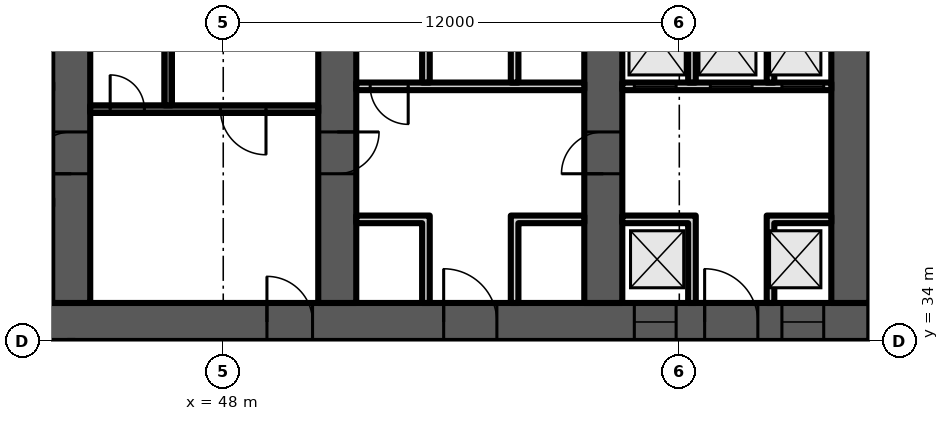
"""IFC4 building model, lengths in metres.
Left out: names, types, materials, properties, quantities, classifications, styles, units other than length and angle.
Written with IfcOpenShell. Run it as: python <this file> out.ifc"""

import sys

from ifc_helpers import new_model, si_unit, direction, frame, frame_2d, origin, place, context, subcontext, project, spatial, polyline, rectangle, outline, extrude, element, fill, save


model = new_model("IFC4")
c1 = context("Model", 3, precision=1e-05, world=origin(), true_north=direction((0.0, 1.0)))
c2 = subcontext(c1, "Body", "Model", "MODEL_VIEW")
j1 = project(units=[si_unit("LENGTHUNIT", "METRE"), si_unit("PLANEANGLEUNIT", "RADIAN")], contexts=[c1])
p1 = place(None, origin())
s1 = spatial("IfcSite", under=j1, at=p1, CompositionType="ELEMENT")
p2 = place(p1, origin())
s2 = spatial("IfcBuilding", under=s1, at=p2, CompositionType="ELEMENT")
p3 = place(p2, frame((0.0, 0.0, 96.7)))
s3 = spatial("IfcBuildingStorey", under=s2, at=p3, CompositionType="ELEMENT", Elevation=96.7)
p4 = place(p3, frame((16.0, 34.5, 0.0), z_axis=(0.0, 0.0, 1.0), x_axis=(1.0, 0.0, 0.0)))
e1 = element("IfcWall", 1, at=p4, inside=s3, PredefinedType="SHEAR", context=c2, shape_type="SweptSolid", body=[
    extrude(rectangle(XDim=49.0, YDim=1.0, at=frame_2d((24.5, 0.0))), origin(), (0.0, 0.0, 1.0), 3.6),
])
p5 = place(p4, frame((1.2, 0.0, 0.0)))
e2 = element("IfcOpeningElement", 2, at=p5, cuts=e1, PredefinedType="OPENING", context=c2, shape_type="SweptSolid", body=[
    extrude(rectangle(XDim=1.1, YDim=2.1, at=frame_2d((0.55, 1.05))), frame((0.0, 0.51, 0.0), z_axis=(0.0, -1.0, 0.0), x_axis=(1.0, 0.0, 0.0)), (0.0, 0.0, 1.0), 1.02),
])
p6 = place(p4, frame((5.083, 0.0, 0.0)))
e3 = element("IfcOpeningElement", 3, at=p6, cuts=e1, PredefinedType="OPENING", context=c2, shape_type="SweptSolid", body=[
    extrude(rectangle(XDim=1.1, YDim=2.1, at=frame_2d((0.55, 1.05))), frame((0.0, 0.51, 0.0), z_axis=(0.0, -1.0, 0.0), x_axis=(1.0, 0.0, 0.0)), (0.0, 0.0, 1.0), 1.02),
])
p7 = place(p4, frame((2.933, 0.0, 0.0)))
e4 = element("IfcOpeningElement", 4, at=p7, cuts=e1, PredefinedType="OPENING", context=c2, shape_type="SweptSolid", body=[
    extrude(rectangle(XDim=1.4, YDim=2.1, at=frame_2d((0.7, 1.05))), frame((0.0, 0.51, 0.0), z_axis=(0.0, -1.0, 0.0), x_axis=(1.0, 0.0, 0.0)), (0.0, 0.0, 1.0), 1.02),
])
p8 = place(p4, frame((7.65, 0.0, 0.0)))
e5 = element("IfcOpeningElement", 5, at=p8, cuts=e1, PredefinedType="OPENING", context=c2, shape_type="SweptSolid", body=[
    extrude(rectangle(XDim=1.2, YDim=2.1, at=frame_2d((0.6, 1.05))), frame((0.0, 0.51, 0.0), z_axis=(0.0, -1.0, 0.0), x_axis=(1.0, 0.0, 0.0)), (0.0, 0.0, 1.0), 1.02),
])
p9 = place(p4, frame((14.817, 0.0, 0.0)))
e6 = element("IfcOpeningElement", 6, at=p9, cuts=e1, PredefinedType="OPENING", context=c2, shape_type="SweptSolid", body=[
    extrude(rectangle(XDim=1.1, YDim=2.1, at=frame_2d((0.55, 1.05))), frame((0.0, 0.51, 0.0), z_axis=(0.0, -1.0, 0.0), x_axis=(1.0, 0.0, 0.0)), (0.0, 0.0, 1.0), 1.02),
])
p10 = place(p4, frame((19.083, 0.0, 0.0)))
e7 = element("IfcOpeningElement", 7, at=p10, cuts=e1, PredefinedType="OPENING", context=c2, shape_type="SweptSolid", body=[
    extrude(rectangle(XDim=1.1, YDim=2.1, at=frame_2d((0.55, 1.05))), frame((0.0, 0.51, 0.0), z_axis=(0.0, -1.0, 0.0), x_axis=(1.0, 0.0, 0.0)), (0.0, 0.0, 1.0), 1.02),
])
p11 = place(p4, frame((16.8, 0.0, 0.0)))
e8 = element("IfcOpeningElement", 8, at=p11, cuts=e1, PredefinedType="OPENING", context=c2, shape_type="SweptSolid", body=[
    extrude(rectangle(XDim=1.4, YDim=2.1, at=frame_2d((0.7, 1.05))), frame((0.0, 0.51, 0.0), z_axis=(0.0, -1.0, 0.0), x_axis=(1.0, 0.0, 0.0)), (0.0, 0.0, 1.0), 1.02),
])
p12 = place(p4, frame((21.817, 0.0, 0.0)))
e9 = element("IfcOpeningElement", 9, at=p12, cuts=e1, PredefinedType="OPENING", context=c2, shape_type="SweptSolid", body=[
    extrude(rectangle(XDim=1.1, YDim=2.1, at=frame_2d((0.55, 1.05))), frame((0.0, 0.51, 0.0), z_axis=(0.0, -1.0, 0.0), x_axis=(1.0, 0.0, 0.0)), (0.0, 0.0, 1.0), 1.02),
])
p13 = place(p4, frame((26.083, 0.0, 0.0)))
e10 = element("IfcOpeningElement", 10, at=p13, cuts=e1, PredefinedType="OPENING", context=c2, shape_type="SweptSolid", body=[
    extrude(rectangle(XDim=1.1, YDim=2.1, at=frame_2d((0.55, 1.05))), frame((0.0, 0.51, 0.0), z_axis=(0.0, -1.0, 0.0), x_axis=(1.0, 0.0, 0.0)), (0.0, 0.0, 1.0), 1.02),
])
p14 = place(p4, frame((33.15, 0.0, 0.0)))
e11 = element("IfcOpeningElement", 11, at=p14, cuts=e1, PredefinedType="OPENING", context=c2, shape_type="SweptSolid", body=[
    extrude(rectangle(XDim=1.2, YDim=2.1, at=frame_2d((0.6, 1.05))), frame((0.0, 0.51, 0.0), z_axis=(0.0, -1.0, 0.0), x_axis=(1.0, 0.0, 0.0)), (0.0, 0.0, 1.0), 1.02),
])
p15 = place(p4, frame((37.8, 0.0, 0.0)))
e12 = element("IfcOpeningElement", 12, at=p15, cuts=e1, PredefinedType="OPENING", context=c2, shape_type="SweptSolid", body=[
    extrude(rectangle(XDim=1.4, YDim=2.1, at=frame_2d((0.7, 1.05))), frame((0.0, 0.51, 0.0), z_axis=(0.0, -1.0, 0.0), x_axis=(1.0, 0.0, 0.0)), (0.0, 0.0, 1.0), 1.02),
])
p16 = place(p4, frame((42.817, 0.0, 0.0)))
e13 = element("IfcOpeningElement", 13, at=p16, cuts=e1, PredefinedType="OPENING", context=c2, shape_type="SweptSolid", body=[
    extrude(rectangle(XDim=1.1, YDim=2.1, at=frame_2d((0.55, 1.05))), frame((0.0, 0.51, 0.0), z_axis=(0.0, -1.0, 0.0), x_axis=(1.0, 0.0, 0.0)), (0.0, 0.0, 1.0), 1.02),
])
p17 = place(p4, frame((46.7, 0.0, 0.0)))
e14 = element("IfcOpeningElement", 14, at=p17, cuts=e1, PredefinedType="OPENING", context=c2, shape_type="SweptSolid", body=[
    extrude(rectangle(XDim=1.1, YDim=2.1, at=frame_2d((0.55, 1.05))), frame((0.0, 0.51, 0.0), z_axis=(0.0, -1.0, 0.0), x_axis=(1.0, 0.0, 0.0)), (0.0, 0.0, 1.0), 1.02),
])
p18 = place(p4, frame((44.667, 0.0, 0.0)))
e15 = element("IfcOpeningElement", 15, at=p18, cuts=e1, PredefinedType="OPENING", context=c2, shape_type="SweptSolid", body=[
    extrude(rectangle(XDim=1.4, YDim=2.1, at=frame_2d((0.7, 1.05))), frame((0.0, 0.51, 0.0), z_axis=(0.0, -1.0, 0.0), x_axis=(1.0, 0.0, 0.0)), (0.0, 0.0, 1.0), 1.02),
])
p19 = place(p3, frame((44.0, 35.0, 0.0), z_axis=(0.0, 0.0, 1.0), x_axis=(0.0, 1.0, 0.0)))
e16 = element("IfcWall", 16, at=p19, inside=s3, PredefinedType="SHEAR", context=c2, shape_type="SweptSolid", body=[
    extrude(rectangle(XDim=14.577, YDim=1.0, at=frame_2d((7.289, 0.0))), origin(), (0.0, 0.0, 1.0), 3.6),
])
p20 = place(p19, frame((3.4, 0.0, 0.0)))
e17 = element("IfcOpeningElement", 17, at=p20, cuts=e16, PredefinedType="OPENING", context=c2, shape_type="SweptSolid", body=[
    extrude(rectangle(XDim=1.1, YDim=2.1, at=frame_2d((0.55, 1.05))), frame((0.0, 0.51, 0.0), z_axis=(0.0, -1.0, 0.0), x_axis=(1.0, 0.0, 0.0)), (0.0, 0.0, 1.0), 1.02),
])
p21 = place(p19, frame((9.8, 0.0, 0.0)))
e18 = element("IfcOpeningElement", 18, at=p21, cuts=e16, PredefinedType="OPENING", context=c2, shape_type="SweptSolid", body=[
    extrude(rectangle(XDim=1.0, YDim=2.1, at=frame_2d((0.5, 1.05))), frame((0.0, 0.51, 0.0), z_axis=(0.0, -1.0, 0.0), x_axis=(1.0, 0.0, 0.0)), (0.0, 0.0, 1.0), 1.02),
])
p22 = place(p3, frame((51.0, 35.0, 0.0), z_axis=(0.0, 0.0, 1.0), x_axis=(0.0, 1.0, 0.0)))
e19 = element("IfcWall", 19, at=p22, inside=s3, PredefinedType="SHEAR", context=c2, shape_type="SweptSolid", body=[
    extrude(rectangle(XDim=13.965, YDim=1.0, at=frame_2d((6.982, 0.0))), origin(), (0.0, 0.0, 1.0), 3.6),
])
p23 = place(p22, frame((3.4, 0.0, 0.0)))
e20 = element("IfcOpeningElement", 20, at=p23, cuts=e19, PredefinedType="OPENING", context=c2, shape_type="SweptSolid", body=[
    extrude(rectangle(XDim=1.1, YDim=2.1, at=frame_2d((0.55, 1.05))), frame((0.0, 0.51, 0.0), z_axis=(0.0, -1.0, 0.0), x_axis=(1.0, 0.0, 0.0)), (0.0, 0.0, 1.0), 1.02),
])
p24 = place(p3, frame((58.0, 35.0, 0.0), z_axis=(0.0, 0.0, 1.0), x_axis=(0.0, 1.0, 0.0)))
e21 = element("IfcWall", 21, at=p24, inside=s3, PredefinedType="SHEAR", context=c2, shape_type="SweptSolid", body=[
    extrude(rectangle(XDim=13.352, YDim=1.0, at=frame_2d((6.676, 0.0))), origin(), (0.0, 0.0, 1.0), 3.6),
])
p25 = place(p24, frame((10.426, 0.0, 0.0)))
e22 = element("IfcOpeningElement", 22, at=p25, cuts=e21, PredefinedType="OPENING", context=c2, shape_type="SweptSolid", body=[
    extrude(rectangle(XDim=1.0, YDim=2.1, at=frame_2d((0.5, 1.05))), frame((0.0, 0.51, 0.0), z_axis=(0.0, -1.0, 0.0), x_axis=(1.0, 0.0, 0.0)), (0.0, 0.0, 1.0), 1.02),
])
p26 = place(p24, frame((3.4, 0.0, 0.0)))
e23 = element("IfcOpeningElement", 23, at=p26, cuts=e21, PredefinedType="OPENING", context=c2, shape_type="SweptSolid", body=[
    extrude(rectangle(XDim=1.1, YDim=2.1, at=frame_2d((0.55, 1.05))), frame((0.0, 0.51, 0.0), z_axis=(0.0, -1.0, 0.0), x_axis=(1.0, 0.0, 0.0)), (0.0, 0.0, 1.0), 1.02),
])
p27 = place(p3, frame((64.5, 35.0, 0.0), z_axis=(0.0, 0.0, 1.0), x_axis=(0.0, 1.0, 0.0)))
e24 = element("IfcWall", 24, at=p27, inside=s3, PredefinedType="SHEAR", context=c2, shape_type="SweptSolid", body=[
    extrude(rectangle(XDim=12.784, YDim=1.0, at=frame_2d((6.392, 0.0))), origin(), (0.0, 0.0, 1.0), 3.6),
])
p28 = place(p3, frame((44.5, 40.1, 0.0), z_axis=(0.0, 0.0, 1.0), x_axis=(1.0, 0.0, 0.0)))
e25 = element("IfcWall", 25, at=p28, inside=s3, PredefinedType="SHEAR", context=c2, shape_type="SweptSolid", body=[
    extrude(rectangle(XDim=6.0, YDim=0.2, at=frame_2d((3.0, 0.0))), origin(), (0.0, 0.0, 1.0), 3.2),
])
p29 = place(p28, frame((3.425, 0.0, 0.0)))
e26 = element("IfcOpeningElement", 26, at=p29, cuts=e25, PredefinedType="OPENING", context=c2, shape_type="SweptSolid", body=[
    extrude(rectangle(XDim=1.2, YDim=2.1, at=frame_2d((0.6, 1.05))), frame((0.0, 0.11, 0.0), z_axis=(0.0, -1.0, 0.0), x_axis=(1.0, 0.0, 0.0)), (0.0, 0.0, 1.0), 0.22),
])
p30 = place(p28, frame((0.525, 0.0, 0.0)))
e27 = element("IfcOpeningElement", 27, at=p30, cuts=e25, PredefinedType="OPENING", context=c2, shape_type="SweptSolid", body=[
    extrude(rectangle(XDim=0.9, YDim=2.1, at=frame_2d((0.45, 1.05))), frame((0.0, 0.11, 0.0), z_axis=(0.0, -1.0, 0.0), x_axis=(1.0, 0.0, 0.0)), (0.0, 0.0, 1.0), 0.22),
])
p31 = place(p3, frame((46.55, 40.2, 0.0), z_axis=(0.0, 0.0, 1.0), x_axis=(0.0, 1.0, 0.0)))
e28 = element("IfcWall", 28, at=p31, inside=s3, PredefinedType="SHEAR", context=c2, shape_type="SweptSolid", body=[
    extrude(rectangle(XDim=7.2, YDim=0.2, at=frame_2d((3.6, 0.0))), origin(), (0.0, 0.0, 1.0), 3.2),
])
p32 = place(p3, frame((51.5, 40.7, 0.0), z_axis=(0.0, 0.0, 1.0), x_axis=(1.0, 0.0, 0.0)))
e29 = element("IfcWall", 29, at=p32, inside=s3, PredefinedType="PARTITIONING", context=c2, shape_type="SweptSolid", body=[
    extrude(rectangle(XDim=6.0, YDim=0.2, at=frame_2d((3.0, 0.0))), origin(), (0.0, 0.0, 1.0), 3.2),
])
p33 = place(p32, frame((0.367, 0.0, 0.0)))
e30 = element("IfcOpeningElement", 30, at=p33, cuts=e29, PredefinedType="OPENING", context=c2, shape_type="SweptSolid", body=[
    extrude(rectangle(XDim=1.0, YDim=2.1, at=frame_2d((0.5, 1.05))), frame((0.0, 0.11, 0.0), z_axis=(0.0, -1.0, 0.0), x_axis=(1.0, 0.0, 0.0)), (0.0, 0.0, 1.0), 0.22),
])
p34 = place(p3, frame((0.0, 0.0, -0.0)))
e31 = element("IfcWall", 31, at=p34, inside=s3, PredefinedType="PARTITIONING", context=c2, shape_type="SweptSolid", body=[
    extrude(outline(polyline([(53.233, 37.1), (51.5, 37.1), (51.5, 37.3), (53.233, 37.3), (53.433, 37.3), (53.433, 35.0), (53.233, 35.0), (53.233, 37.1)])), origin(), (0.0, 0.0, 1.0), 3.2),
])
p35 = place(p3, frame((0.0, 0.0, -0.0)))
e32 = element("IfcWall", 32, at=p35, inside=s3, PredefinedType="PARTITIONING", context=c2, shape_type="SweptSolid", body=[
    extrude(outline(polyline([(55.567, 37.3), (55.767, 37.3), (57.5, 37.3), (57.5, 37.1), (55.767, 37.1), (55.767, 35.0), (55.567, 35.0), (55.567, 37.3)])), origin(), (0.0, 0.0, 1.0), 3.2),
])
p36 = place(p3, frame((0.0, 0.0, -0.0)))
e33 = element("IfcWall", 33, at=p36, inside=s3, PredefinedType="PARTITIONING", context=c2, shape_type="SweptSolid", body=[
    extrude(outline(polyline([(53.233, 40.8), (53.233, 43.8), (53.433, 43.8), (53.433, 40.8), (53.233, 40.8)])), origin(), (0.0, 0.0, 1.0), 3.2),
])
p37 = place(p3, frame((0.0, 0.0, -0.0)))
e34 = element("IfcWall", 34, at=p37, inside=s3, PredefinedType="PARTITIONING", context=c2, shape_type="SweptSolid", body=[
    extrude(outline(polyline([(55.567, 40.8), (55.567, 43.8), (55.767, 43.8), (55.767, 40.8), (55.567, 40.8)])), origin(), (0.0, 0.0, 1.0), 3.2),
])
p38 = place(p3, frame((58.5, 40.7, 0.0), z_axis=(0.0, 0.0, 1.0), x_axis=(1.0, 0.0, 0.0)))
e35 = element("IfcWall", 35, at=p38, inside=s3, PredefinedType="PARTITIONING", context=c2, shape_type="SweptSolid", body=[
    extrude(rectangle(XDim=5.5, YDim=0.2, at=frame_2d((2.75, 0.0))), origin(), (0.0, 0.0, 1.0), 3.2),
])
p39 = place(p38, frame((0.317, 0.0, 0.0)))
e36 = element("IfcOpeningElement", 36, at=p39, cuts=e35, PredefinedType="OPENING", context=c2, shape_type="SweptSolid", body=[
    extrude(rectangle(XDim=1.1, YDim=2.1, at=frame_2d((0.55, 1.05))), frame((0.0, 0.11, 0.0), z_axis=(0.0, -1.0, 0.0), x_axis=(1.0, 0.0, 0.0)), (0.0, 0.0, 1.0), 0.22),
])
p40 = place(p38, frame((2.317, 0.0, 0.0)))
e37 = element("IfcOpeningElement", 37, at=p40, cuts=e35, PredefinedType="OPENING", context=c2, shape_type="SweptSolid", body=[
    extrude(rectangle(XDim=1.1, YDim=2.1, at=frame_2d((0.55, 1.05))), frame((0.0, 0.11, 0.0), z_axis=(0.0, -1.0, 0.0), x_axis=(1.0, 0.0, 0.0)), (0.0, 0.0, 1.0), 0.22),
])
p41 = place(p38, frame((4.2, 0.0, 0.0)))
e38 = element("IfcOpeningElement", 38, at=p41, cuts=e35, PredefinedType="OPENING", context=c2, shape_type="SweptSolid", body=[
    extrude(rectangle(XDim=1.1, YDim=2.1, at=frame_2d((0.55, 1.05))), frame((0.0, 0.11, 0.0), z_axis=(0.0, -1.0, 0.0), x_axis=(1.0, 0.0, 0.0)), (0.0, 0.0, 1.0), 0.22),
])
p42 = place(p3, frame((0.0, 0.0, -0.0)))
e39 = element("IfcWall", 39, at=p42, inside=s3, PredefinedType="PARTITIONING", context=c2, shape_type="SweptSolid", body=[
    extrude(outline(polyline([(60.233, 37.1), (58.5, 37.1), (58.5, 37.3), (60.233, 37.3), (60.433, 37.3), (60.433, 35.0), (60.233, 35.0), (60.233, 37.1)])), origin(), (0.0, 0.0, 1.0), 3.2),
])
p43 = place(p3, frame((0.0, 0.0, -0.0)))
e40 = element("IfcWall", 40, at=p43, inside=s3, PredefinedType="PARTITIONING", context=c2, shape_type="SweptSolid", body=[
    extrude(outline(polyline([(62.3, 37.3), (62.5, 37.3), (64.0, 37.3), (64.0, 37.1), (62.5, 37.1), (62.5, 35.0), (62.3, 35.0), (62.3, 37.3)])), origin(), (0.0, 0.0, 1.0), 3.2),
])
p44 = place(p3, frame((0.0, 0.0, -0.0)))
e41 = element("IfcWall", 41, at=p44, inside=s3, PredefinedType="PARTITIONING", context=c2, shape_type="SweptSolid", body=[
    extrude(outline(polyline([(60.433, 40.8), (60.233, 40.8), (60.233, 43.8), (58.5, 43.8), (58.5, 44.0), (64.0, 44.0), (64.0, 43.8), (62.5, 43.8), (62.5, 40.8), (62.3, 40.8), (62.3, 43.8), (60.433, 43.8), (60.433, 40.8)])), origin(), (0.0, 0.0, 1.0), 3.2),
])
p45 = place(p29, origin())
e42 = element("IfcDoor", 42, at=p45, inside=s3, OperationType="SINGLE_SWING_RIGHT", PredefinedType="DOOR", context=c2, shape_type="SweptSolid", body=[
    extrude(rectangle(XDim=1.2, YDim=2.1, at=frame_2d((0.6, 1.05))), frame((0.0, 0.025, 0.0), z_axis=(0.0, -1.0, 0.0), x_axis=(1.0, 0.0, 0.0)), (0.0, 0.0, 1.0), 0.05),
])
fill(e26, e42)
p46 = place(p30, origin())
e43 = element("IfcDoor", 43, at=p46, inside=s3, OperationType="SINGLE_SWING_LEFT", PredefinedType="DOOR", context=c2, shape_type="SweptSolid", body=[
    extrude(rectangle(XDim=0.9, YDim=2.1, at=frame_2d((0.45, 1.05))), frame((0.0, 0.025, 0.0), z_axis=(0.0, -1.0, 0.0), x_axis=(1.0, 0.0, 0.0)), (0.0, 0.0, 1.0), 0.05),
])
fill(e27, e43)
p47 = place(p14, origin())
e44 = element("IfcDoor", 44, at=p47, inside=s3, OperationType="SINGLE_SWING_LEFT", PredefinedType="DOOR", context=c2, shape_type="SweptSolid", body=[
    extrude(rectangle(XDim=1.2, YDim=2.1, at=frame_2d((0.6, 1.05))), frame((0.0, 0.025, 0.0), z_axis=(0.0, -1.0, 0.0), x_axis=(1.0, 0.0, 0.0)), (0.0, 0.0, 1.0), 0.05),
])
fill(e11, e44)
p48 = place(p15, origin())
e45 = element("IfcDoor", 45, at=p48, inside=s3, OperationType="DOUBLE_DOOR_SINGLE_SWING", PredefinedType="DOOR", context=c2, shape_type="SweptSolid", body=[
    extrude(rectangle(XDim=1.4, YDim=2.1, at=frame_2d((0.7, 1.05))), frame((0.0, 0.025, 0.0), z_axis=(0.0, -1.0, 0.0), x_axis=(1.0, 0.0, 0.0)), (0.0, 0.0, 1.0), 0.05),
])
fill(e12, e45)
p49 = place(p33, origin())
e46 = element("IfcDoor", 46, at=p49, inside=s3, OperationType="SINGLE_SWING_RIGHT", PredefinedType="DOOR", context=c2, shape_type="SweptSolid", body=[
    extrude(rectangle(XDim=1.0, YDim=2.1, at=frame_2d((0.5, 1.05))), frame((0.0, 0.025, 0.0), z_axis=(0.0, -1.0, 0.0), x_axis=(1.0, 0.0, 0.0)), (0.0, 0.0, 1.0), 0.05),
])
fill(e30, e46)
p50 = place(p16, origin())
e47 = element("IfcDoor", 47, at=p50, inside=s3, OperationType="DOUBLE_DOOR_SLIDING", PredefinedType="DOOR", context=c2, shape_type="SweptSolid", body=[
    extrude(rectangle(XDim=1.1, YDim=2.1, at=frame_2d((0.55, 1.05))), frame((0.0, 0.025, 0.0), z_axis=(0.0, -1.0, 0.0), x_axis=(1.0, 0.0, 0.0)), (0.0, 0.0, 1.0), 0.05),
])
fill(e13, e47)
p51 = place(p17, origin())
e48 = element("IfcDoor", 48, at=p51, inside=s3, OperationType="DOUBLE_DOOR_SLIDING", PredefinedType="DOOR", context=c2, shape_type="SweptSolid", body=[
    extrude(rectangle(XDim=1.1, YDim=2.1, at=frame_2d((0.55, 1.05))), frame((0.0, 0.025, 0.0), z_axis=(0.0, -1.0, 0.0), x_axis=(1.0, 0.0, 0.0)), (0.0, 0.0, 1.0), 0.05),
])
fill(e14, e48)
p52 = place(p18, origin())
e49 = element("IfcDoor", 49, at=p52, inside=s3, OperationType="DOUBLE_DOOR_SINGLE_SWING", PredefinedType="DOOR", context=c2, shape_type="SweptSolid", body=[
    extrude(rectangle(XDim=1.4, YDim=2.1, at=frame_2d((0.7, 1.05))), frame((0.0, 0.025, 0.0), z_axis=(0.0, -1.0, 0.0), x_axis=(1.0, 0.0, 0.0)), (0.0, 0.0, 1.0), 0.05),
])
fill(e15, e49)
p53 = place(p39, origin())
e50 = element("IfcDoor", 50, at=p53, inside=s3, OperationType="DOUBLE_DOOR_SLIDING", PredefinedType="DOOR", context=c2, shape_type="SweptSolid", body=[
    extrude(rectangle(XDim=1.1, YDim=2.1, at=frame_2d((0.55, 1.05))), frame((0.0, 0.025, 0.0), z_axis=(0.0, -1.0, 0.0), x_axis=(1.0, 0.0, 0.0)), (0.0, 0.0, 1.0), 0.05),
])
fill(e36, e50)
p54 = place(p40, origin())
e51 = element("IfcDoor", 51, at=p54, inside=s3, OperationType="DOUBLE_DOOR_SLIDING", PredefinedType="DOOR", context=c2, shape_type="SweptSolid", body=[
    extrude(rectangle(XDim=1.1, YDim=2.1, at=frame_2d((0.55, 1.05))), frame((0.0, 0.025, 0.0), z_axis=(0.0, -1.0, 0.0), x_axis=(1.0, 0.0, 0.0)), (0.0, 0.0, 1.0), 0.05),
])
fill(e37, e51)
p55 = place(p41, origin())
e52 = element("IfcDoor", 52, at=p55, inside=s3, OperationType="DOUBLE_DOOR_SLIDING", PredefinedType="DOOR", context=c2, shape_type="SweptSolid", body=[
    extrude(rectangle(XDim=1.1, YDim=2.1, at=frame_2d((0.55, 1.05))), frame((0.0, 0.025, 0.0), z_axis=(0.0, -1.0, 0.0), x_axis=(1.0, 0.0, 0.0)), (0.0, 0.0, 1.0), 0.05),
])
fill(e38, e52)
p56 = place(p20, origin())
e53 = element("IfcDoor", 53, at=p56, inside=s3, OperationType="SINGLE_SWING_LEFT", PredefinedType="DOOR", context=c2, shape_type="SweptSolid", body=[
    extrude(rectangle(XDim=1.1, YDim=2.1, at=frame_2d((0.55, 1.05))), frame((0.0, 0.025, 0.0), z_axis=(0.0, -1.0, 0.0), x_axis=(1.0, 0.0, 0.0)), (0.0, 0.0, 1.0), 0.05),
])
fill(e17, e53)
p57 = place(p23, origin())
e54 = element("IfcDoor", 54, at=p57, inside=s3, OperationType="SINGLE_SWING_RIGHT", PredefinedType="DOOR", context=c2, shape_type="SweptSolid", body=[
    extrude(rectangle(XDim=1.1, YDim=2.1, at=frame_2d((0.55, 1.05))), frame((0.0, 0.025, 0.0), z_axis=(0.0, -1.0, 0.0), x_axis=(1.0, 0.0, 0.0)), (0.0, 0.0, 1.0), 0.05),
])
fill(e20, e54)
p58 = place(p26, origin())
e55 = element("IfcDoor", 55, at=p58, inside=s3, OperationType="SINGLE_SWING_LEFT", PredefinedType="DOOR", context=c2, shape_type="SweptSolid", body=[
    extrude(rectangle(XDim=1.1, YDim=2.1, at=frame_2d((0.55, 1.05))), frame((0.0, 0.025, 0.0), z_axis=(0.0, -1.0, 0.0), x_axis=(1.0, 0.0, 0.0)), (0.0, 0.0, 1.0), 0.05),
])
fill(e23, e55)
save(model, sys.argv[1])
